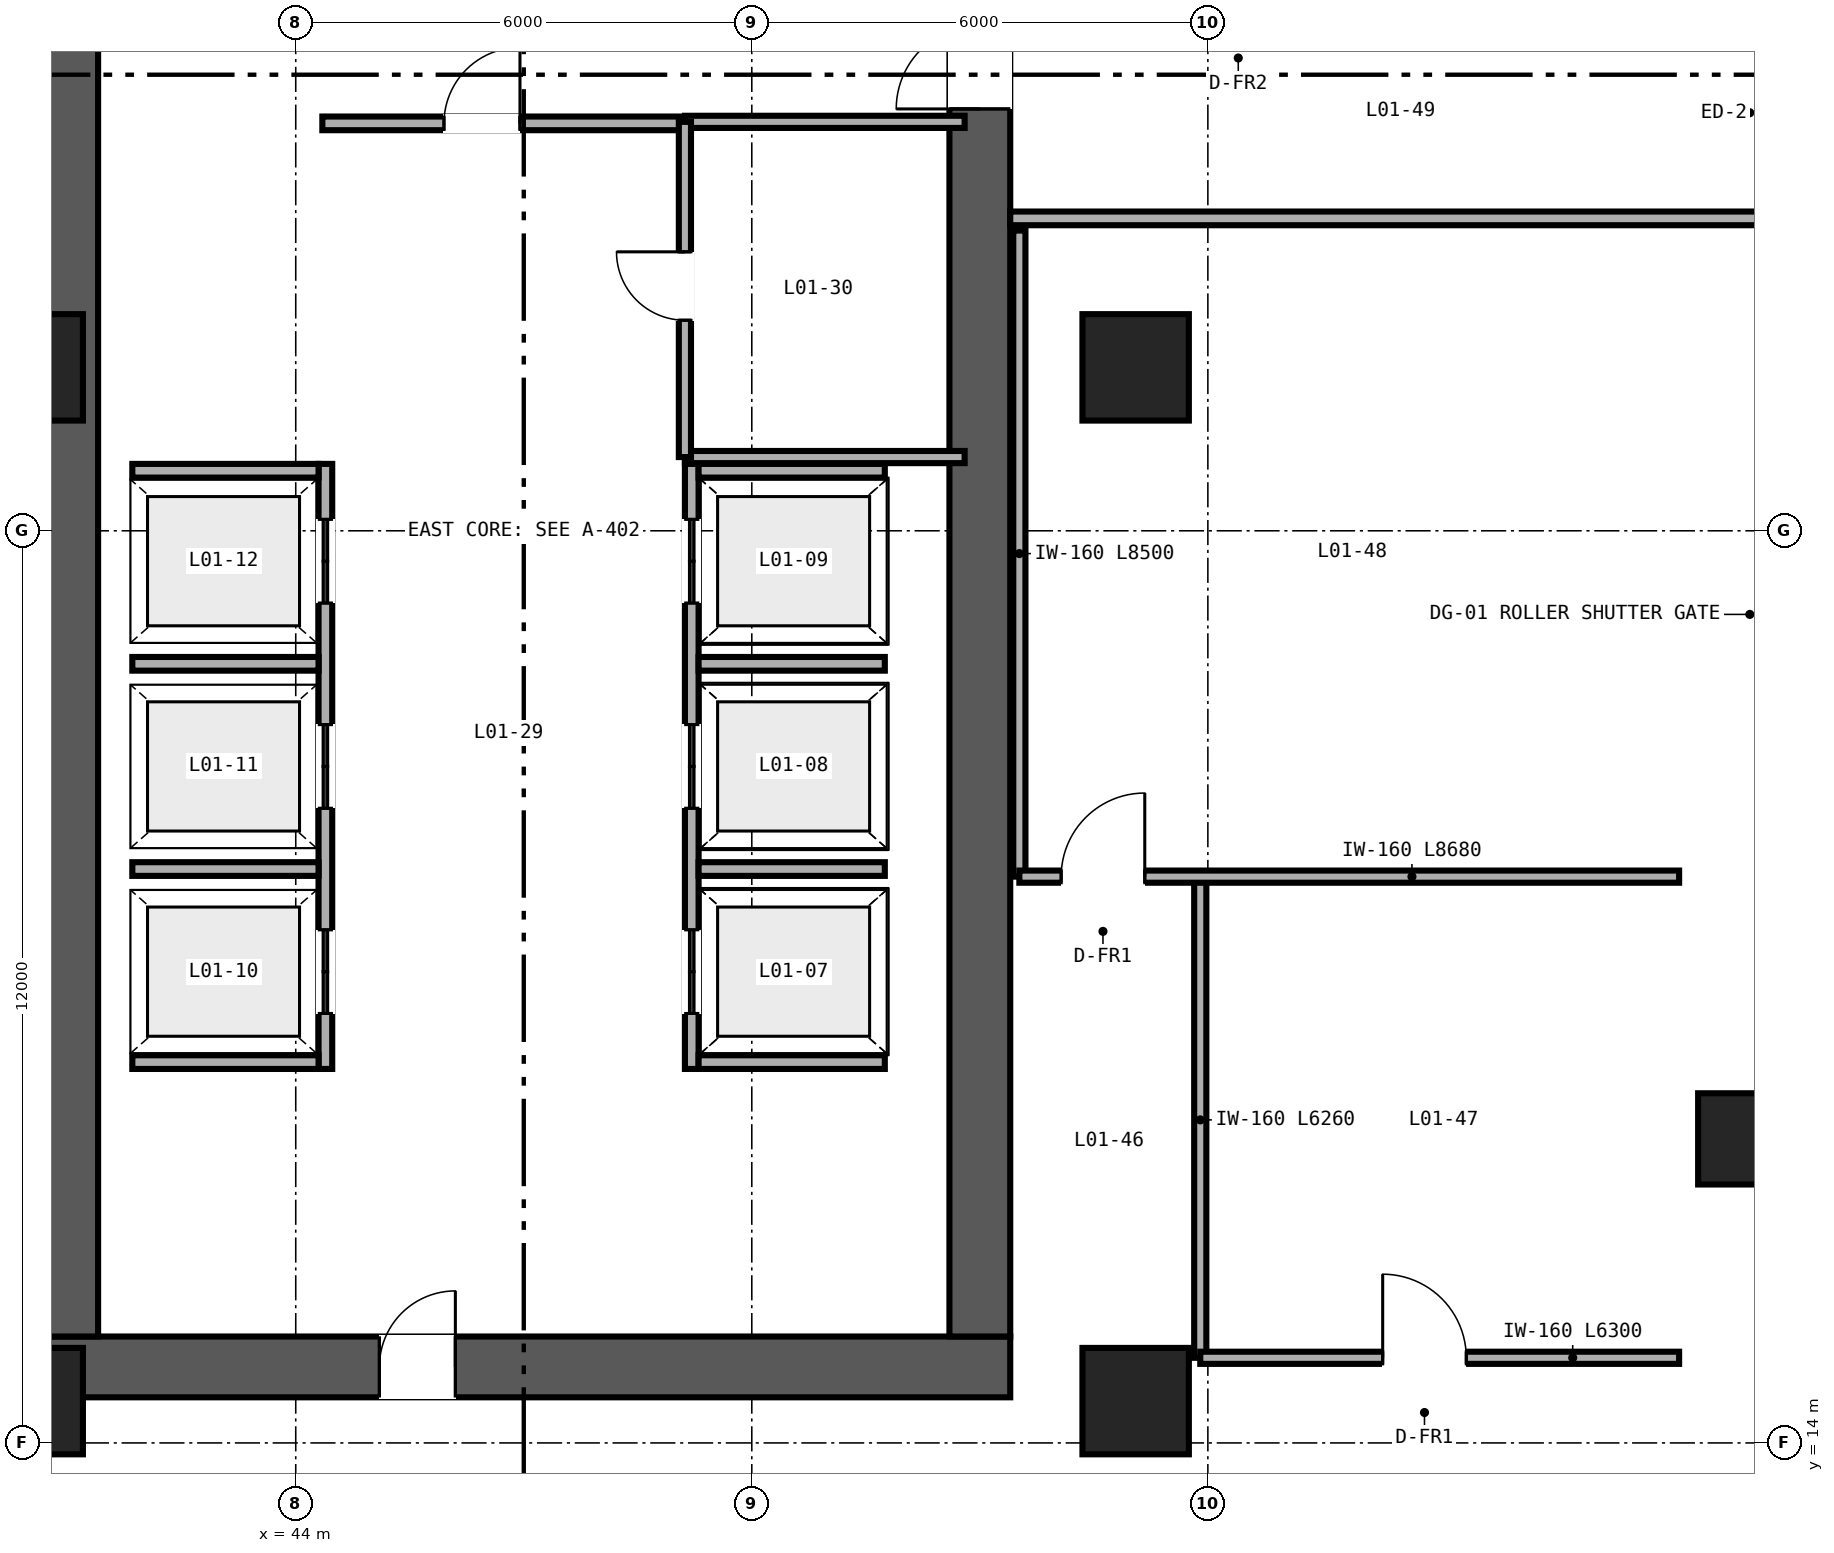
"""IFC4 building model, lengths in metres.
Left out: names, types, materials, properties, quantities, classifications, styles, units other than length and angle.
Written with IfcOpenShell. Run it as: python <this file> out.ifc"""

import sys

from ifc_helpers import new_model, si_unit, direction, frame, frame_2d, origin, origin_2d, place, context, subcontext, project, spatial, rectangle, extrude, source, transform, mapped, element, fill, save


model = new_model("IFC4")
c1 = context("Model", 3, precision=1e-05, world=origin(), true_north=direction((0.0, 1.0)))
c2 = subcontext(c1, "Body", "Model", "MODEL_VIEW")
j1 = project(units=[si_unit("LENGTHUNIT", "METRE"), si_unit("PLANEANGLEUNIT", "RADIAN")], contexts=[c1])
p1 = place(None, origin())
s1 = spatial("IfcSite", under=j1, at=p1, CompositionType="ELEMENT")
p2 = place(p1, origin())
s2 = spatial("IfcBuilding", under=s1, at=p2, CompositionType="ELEMENT")
p3 = place(p2, origin())
s3 = spatial("IfcBuildingStorey", under=s2, at=p3, CompositionType="ELEMENT", Elevation=0.0)
p4 = place(p3, frame((40.6, 15.0, 0.0), z_axis=(0.0, 0.0, 1.0), x_axis=(1.0, 0.0, 0.0)))
e1 = element("IfcWall", 1, at=p4, inside=s3, PredefinedType="SHEAR", context=c2, shape_type="SweptSolid", body=[
    extrude(rectangle(XDim=12.8, YDim=0.8, at=frame_2d((6.4, 0.0))), origin(), (0.0, 0.0, 1.0), 5.71),
])
p5 = place(p4, frame((4.5, 0.0, 0.0)))
e2 = element("IfcOpeningElement", 2, at=p5, cuts=e1, PredefinedType="OPENING", context=c2, shape_type="SweptSolid", body=[
    extrude(rectangle(XDim=1.0, YDim=2.15, at=frame_2d((0.5, 1.075))), frame((0.0, 0.41, 0.0), z_axis=(0.0, -1.0, 0.0), x_axis=(1.0, 0.0, 0.0)), (0.0, 0.0, 1.0), 0.82),
])
p6 = place(p3, frame((41.0, 15.4, 0.0), z_axis=(0.0, 0.0, 1.0), x_axis=(0.0, 1.0, 0.0)))
e3 = element("IfcWall", 3, at=p6, inside=s3, PredefinedType="SHEAR", context=c2, shape_type="SweptSolid", body=[
    extrude(rectangle(XDim=21.2, YDim=0.8, at=frame_2d((10.6, 0.0))), origin(), (0.0, 0.0, 1.0), 5.71),
])
p7 = place(p3, frame((53.0, 15.4, 0.0), z_axis=(0.0, 0.0, 1.0), x_axis=(0.0, 1.0, 0.0)))
e4 = element("IfcWall", 4, at=p7, inside=s3, PredefinedType="SHEAR", context=c2, shape_type="SweptSolid", body=[
    extrude(rectangle(XDim=21.2, YDim=0.8, at=frame_2d((10.6, 0.0))), origin(), (0.0, 0.0, 1.0), 5.71),
])
p8 = place(p7, frame((16.15, 0.0, 0.0)))
e5 = element("IfcOpeningElement", 5, at=p8, cuts=e4, PredefinedType="OPENING", context=c2, shape_type="SweptSolid", body=[
    extrude(rectangle(XDim=1.1, YDim=2.15, at=frame_2d((0.55, 1.075))), frame((0.0, 0.41, 0.0), z_axis=(0.0, -1.0, 0.0), x_axis=(1.0, 0.0, 0.0)), (0.0, 0.0, 1.0), 0.82),
])
m1 = source(origin(), c2, "Body", "SweptSolid", [
    extrude(rectangle(XDim=1.2, YDim=1.2, at=origin_2d()), origin(), (0.0, 0.0, 1.0), 5.71),
])
p9 = place(p3, frame((63.05, 18.0, 0.0), z_axis=(0.0, 0.0, 1.0), x_axis=(1.0, 0.0, 0.0)))
e6 = element("IfcColumn", 6, at=p9, inside=s3, PredefinedType="COLUMN", context=c2, shape_type="MappedRepresentation", body=[
    mapped(m1, transform((0.0, 0.0, 0.0), scale=1.0)),
])
m2 = source(origin(), c2, "Body", "SweptSolid", [
    extrude(rectangle(XDim=1.4, YDim=1.4, at=origin_2d()), origin(), (0.0, 0.0, 1.0), 5.71),
])
for number, where, z_axis, x_axis in (
    (7, (40.5, 14.55, 0.0), (0.0, 0.0, 1.0), (1.0, 0.0, 0.0)),
    (8, (55.05, 14.55, 0.0), (0.0, 0.0, 1.0), (1.0, 0.0, 0.0)),
    (9, (40.5, 28.15, 0.0), (0.0, 0.0, 1.0), (1.0, 0.0, 0.0)),
    (10, (55.05, 28.15, 0.0), (0.0, 0.0, 1.0), (1.0, 0.0, 0.0)),
):
    element("IfcColumn", number, at=place(p3, frame(where, z_axis=z_axis, x_axis=x_axis)), inside=s3, PredefinedType="COLUMN", context=c2, shape_type="MappedRepresentation", body=[
        mapped(m2, transform((0.0, 0.0, 0.0), scale=1.0)),
    ])
p10 = place(p3, frame((49.21, 18.92, 0.0), z_axis=(0.0, 0.0, 1.0), x_axis=(0.0, 1.0, 0.0)))
e11 = element("IfcWall", 11, at=p10, inside=s3, PredefinedType="SOLIDWALL", context=c2, shape_type="SweptSolid", body=[
    extrude(rectangle(XDim=7.96, YDim=0.18, at=frame_2d((3.98, 0.0))), origin(), (0.0, 0.0, 1.0), 5.71),
])
p11 = place(p10, frame((0.73, 0.0, 0.0)))
e12 = element("IfcOpeningElement", 12, at=p11, cuts=e11, PredefinedType="OPENING", context=c2, shape_type="SweptSolid", body=[
    extrude(rectangle(XDim=1.1, YDim=2.2, at=frame_2d((0.55, 1.1))), frame((0.0, 0.1, 0.0), z_axis=(0.0, -1.0, 0.0), x_axis=(1.0, 0.0, 0.0)), (0.0, 0.0, 1.0), 0.2),
])
p12 = place(p10, frame((3.43, 0.0, 0.0)))
e13 = element("IfcOpeningElement", 13, at=p12, cuts=e11, PredefinedType="OPENING", context=c2, shape_type="SweptSolid", body=[
    extrude(rectangle(XDim=1.1, YDim=2.2, at=frame_2d((0.55, 1.1))), frame((0.0, 0.1, 0.0), z_axis=(0.0, -1.0, 0.0), x_axis=(1.0, 0.0, 0.0)), (0.0, 0.0, 1.0), 0.2),
])
p13 = place(p10, frame((6.13, 0.0, 0.0)))
e14 = element("IfcOpeningElement", 14, at=p13, cuts=e11, PredefinedType="OPENING", context=c2, shape_type="SweptSolid", body=[
    extrude(rectangle(XDim=1.1, YDim=2.2, at=frame_2d((0.55, 1.1))), frame((0.0, 0.1, 0.0), z_axis=(0.0, -1.0, 0.0), x_axis=(1.0, 0.0, 0.0)), (0.0, 0.0, 1.0), 0.2),
])
for number, where, z_axis, x_axis in (
    (15, (49.3, 19.01, 0.0), (0.0, 0.0, 1.0), (1.0, 0.0, 0.0)),
    (16, (49.3, 26.79, 0.0), (0.0, 0.0, 1.0), (1.0, 0.0, 0.0)),
    (17, (49.3, 21.55, 0.0), (0.0, 0.0, 1.0), (1.0, 0.0, 0.0)),
    (18, (49.3, 24.25, 0.0), (0.0, 0.0, 1.0), (1.0, 0.0, 0.0)),
):
    element("IfcWall", number, at=place(p3, frame(where, z_axis=z_axis, x_axis=x_axis)), inside=s3, PredefinedType="SOLIDWALL", context=c2, shape_type="SweptSolid", body=[
        extrude(rectangle(XDim=2.45, YDim=0.18, at=frame_2d((1.225, 0.0))), origin(), (0.0, 0.0, 1.0), 5.71),
    ])
p14 = place(p3, frame((44.39, 18.92, 0.0), z_axis=(0.0, 0.0, 1.0), x_axis=(0.0, 1.0, 0.0)))
e19 = element("IfcWall", 19, at=p14, inside=s3, PredefinedType="SOLIDWALL", context=c2, shape_type="SweptSolid", body=[
    extrude(rectangle(XDim=7.96, YDim=0.18, at=frame_2d((3.98, 0.0))), origin(), (0.0, 0.0, 1.0), 5.71),
])
p15 = place(p14, frame((0.73, 0.0, 0.0)))
e20 = element("IfcOpeningElement", 20, at=p15, cuts=e19, PredefinedType="OPENING", context=c2, shape_type="SweptSolid", body=[
    extrude(rectangle(XDim=1.1, YDim=2.2, at=frame_2d((0.55, 1.1))), frame((0.0, 0.1, 0.0), z_axis=(0.0, -1.0, 0.0), x_axis=(1.0, 0.0, 0.0)), (0.0, 0.0, 1.0), 0.2),
])
p16 = place(p14, frame((3.43, 0.0, 0.0)))
e21 = element("IfcOpeningElement", 21, at=p16, cuts=e19, PredefinedType="OPENING", context=c2, shape_type="SweptSolid", body=[
    extrude(rectangle(XDim=1.1, YDim=2.2, at=frame_2d((0.55, 1.1))), frame((0.0, 0.1, 0.0), z_axis=(0.0, -1.0, 0.0), x_axis=(1.0, 0.0, 0.0)), (0.0, 0.0, 1.0), 0.2),
])
p17 = place(p14, frame((6.13, 0.0, 0.0)))
e22 = element("IfcOpeningElement", 22, at=p17, cuts=e19, PredefinedType="OPENING", context=c2, shape_type="SweptSolid", body=[
    extrude(rectangle(XDim=1.1, YDim=2.2, at=frame_2d((0.55, 1.1))), frame((0.0, 0.1, 0.0), z_axis=(0.0, -1.0, 0.0), x_axis=(1.0, 0.0, 0.0)), (0.0, 0.0, 1.0), 0.2),
])
for number, where, z_axis, x_axis in (
    (23, (41.85, 19.01, 0.0), (0.0, 0.0, 1.0), (1.0, 0.0, 0.0)),
    (24, (41.85, 26.79, 0.0), (0.0, 0.0, 1.0), (1.0, 0.0, 0.0)),
    (25, (41.85, 21.55, 0.0), (0.0, 0.0, 1.0), (1.0, 0.0, 0.0)),
    (26, (41.85, 24.25, 0.0), (0.0, 0.0, 1.0), (1.0, 0.0, 0.0)),
):
    element("IfcWall", number, at=place(p3, frame(where, z_axis=z_axis, x_axis=x_axis)), inside=s3, PredefinedType="SOLIDWALL", context=c2, shape_type="SweptSolid", body=[
        extrude(rectangle(XDim=2.45, YDim=0.18, at=frame_2d((1.225, 0.0))), origin(), (0.0, 0.0, 1.0), 5.71),
    ])
p18 = place(p3, frame((44.35, 31.36, 0.0), z_axis=(0.0, 0.0, 1.0), x_axis=(1.0, 0.0, 0.0)))
e27 = element("IfcWall", 27, at=p18, inside=s3, PredefinedType="SOLIDWALL", context=c2, shape_type="SweptSolid", body=[
    extrude(rectangle(XDim=4.85, YDim=0.18, at=frame_2d((2.425, 0.0))), origin(), (0.0, 0.0, 1.0), 4.61),
])
p19 = place(p18, frame((1.6, 0.0, 0.0)))
e28 = element("IfcOpeningElement", 28, at=p19, cuts=e27, PredefinedType="OPENING", context=c2, shape_type="SweptSolid", body=[
    extrude(rectangle(XDim=1.0, YDim=2.15, at=frame_2d((0.5, 1.075))), frame((0.0, 0.1, 0.0), z_axis=(0.0, -1.0, 0.0), x_axis=(1.0, 0.0, 0.0)), (0.0, 0.0, 1.0), 0.2),
])
p20 = place(p3, frame((49.12, 26.97, 0.0), z_axis=(0.0, 0.0, 1.0), x_axis=(1.0, 0.0, 0.0)))
e29 = element("IfcWall", 29, at=p20, inside=s3, PredefinedType="PARTITIONING", context=c2, shape_type="SweptSolid", body=[
    extrude(rectangle(XDim=3.68, YDim=0.16, at=frame_2d((1.84, 0.0))), origin(), (0.0, 0.0, 1.0), 5.71),
])
p21 = place(p3, frame((49.12, 31.38, 0.0), z_axis=(0.0, 0.0, 1.0), x_axis=(1.0, 0.0, 0.0)))
e30 = element("IfcWall", 30, at=p21, inside=s3, PredefinedType="PARTITIONING", context=c2, shape_type="SweptSolid", body=[
    extrude(rectangle(XDim=3.68, YDim=0.16, at=frame_2d((1.84, 0.0))), origin(), (0.0, 0.0, 1.0), 4.61),
])
p22 = place(p3, frame((49.12, 26.97, 0.0), z_axis=(0.0, 0.0, 1.0), x_axis=(0.0, 1.0, 0.0)))
e31 = element("IfcWall", 31, at=p22, inside=s3, PredefinedType="PARTITIONING", context=c2, shape_type="SweptSolid", body=[
    extrude(rectangle(XDim=4.41, YDim=0.16, at=frame_2d((2.205, 0.0))), origin(), (0.0, 0.0, 1.0), 4.61),
])
p23 = place(p22, frame((1.8, 0.0, 0.0)))
e32 = element("IfcOpeningElement", 32, at=p23, cuts=e31, PredefinedType="OPENING", context=c2, shape_type="SweptSolid", body=[
    extrude(rectangle(XDim=0.9, YDim=2.15, at=frame_2d((0.45, 1.075))), frame((0.0, 0.09, 0.0), z_axis=(0.0, -1.0, 0.0), x_axis=(1.0, 0.0, 0.0)), (0.0, 0.0, 1.0), 0.18),
])
p24 = place(p3, frame((55.9, 15.12, 0.0), z_axis=(0.0, 0.0, 1.0), x_axis=(0.0, 1.0, 0.0)))
e33 = element("IfcWall", 33, at=p24, inside=s3, PredefinedType="PARTITIONING", context=c2, shape_type="SweptSolid", body=[
    extrude(rectangle(XDim=6.26, YDim=0.16, at=frame_2d((3.13, 0.0))), origin(), (0.0, 0.0, 1.0), 5.71),
])
p25 = place(p3, frame((55.9, 15.12, 0.0), z_axis=(0.0, 0.0, 1.0), x_axis=(1.0, 0.0, 0.0)))
e34 = element("IfcWall", 34, at=p25, inside=s3, PredefinedType="PARTITIONING", context=c2, shape_type="SweptSolid", body=[
    extrude(rectangle(XDim=6.3, YDim=0.16, at=frame_2d((3.15, 0.0))), origin(), (0.0, 0.0, 1.0), 5.71),
])
p26 = place(p25, frame((2.4, 0.0, 0.0)))
e35 = element("IfcOpeningElement", 35, at=p26, cuts=e34, PredefinedType="OPENING", context=c2, shape_type="SweptSolid", body=[
    extrude(rectangle(XDim=1.1, YDim=2.15, at=frame_2d((0.55, 1.075))), frame((0.0, 0.09, 0.0), z_axis=(0.0, -1.0, 0.0), x_axis=(1.0, 0.0, 0.0)), (0.0, 0.0, 1.0), 0.18),
])
p27 = place(p3, frame((53.52, 21.45, 0.0), z_axis=(0.0, 0.0, 1.0), x_axis=(0.0, 1.0, 0.0)))
e36 = element("IfcWall", 36, at=p27, inside=s3, PredefinedType="PARTITIONING", context=c2, shape_type="SweptSolid", body=[
    extrude(rectangle(XDim=8.5, YDim=0.16, at=frame_2d((4.25, 0.0))), origin(), (0.0, 0.0, 1.0), 4.783),
])
p28 = place(p3, frame((53.52, 21.45, 0.0), z_axis=(0.0, 0.0, 1.0), x_axis=(1.0, 0.0, 0.0)))
e37 = element("IfcWall", 37, at=p28, inside=s3, PredefinedType="PARTITIONING", context=c2, shape_type="SweptSolid", body=[
    extrude(rectangle(XDim=8.68, YDim=0.16, at=frame_2d((4.34, 0.0))), origin(), (0.0, 0.0, 1.0), 4.931),
])
p29 = place(p28, frame((0.55, 0.0, 0.0)))
e38 = element("IfcOpeningElement", 38, at=p29, cuts=e37, PredefinedType="OPENING", context=c2, shape_type="SweptSolid", body=[
    extrude(rectangle(XDim=1.1, YDim=2.15, at=frame_2d((0.55, 1.075))), frame((0.0, 0.09, 0.0), z_axis=(0.0, -1.0, 0.0), x_axis=(1.0, 0.0, 0.0)), (0.0, 0.0, 1.0), 0.18),
])
p30 = place(p3, frame((53.4, 30.11, 0.0), z_axis=(0.0, 0.0, 1.0), x_axis=(1.0, 0.0, 0.0)))
e39 = element("IfcWall", 39, at=p30, inside=s3, PredefinedType="SOLIDWALL", context=c2, shape_type="SweptSolid", body=[
    extrude(rectangle(XDim=10.25, YDim=0.18, at=frame_2d((5.125, 0.0))), origin(), (0.0, 0.0, 1.0), 4.931),
])
m3 = source(origin(), c2, "Body", "SweptSolid", [
    extrude(rectangle(XDim=1.1, YDim=2.2, at=frame_2d((0.55, 1.1))), frame((0.0, 0.025, 0.0), z_axis=(0.0, -1.0, 0.0), x_axis=(1.0, 0.0, 0.0)), (0.0, 0.0, 1.0), 0.05),
])
p31 = place(p11, origin())
e40 = element("IfcDoor", 40, at=p31, inside=s3, OperationType="DOUBLE_DOOR_SLIDING", PredefinedType="DOOR", context=c2, shape_type="MappedRepresentation", body=[
    mapped(m3, transform((0.0, 0.0, 0.0), scale=1.0)),
])
fill(e12, e40)
p32 = place(p12, origin())
e41 = element("IfcDoor", 41, at=p32, inside=s3, OperationType="DOUBLE_DOOR_SLIDING", PredefinedType="DOOR", context=c2, shape_type="MappedRepresentation", body=[
    mapped(m3, transform((0.0, 0.0, 0.0), scale=1.0)),
])
fill(e13, e41)
p33 = place(p13, origin())
e42 = element("IfcDoor", 42, at=p33, inside=s3, OperationType="DOUBLE_DOOR_SLIDING", PredefinedType="DOOR", context=c2, shape_type="MappedRepresentation", body=[
    mapped(m3, transform((0.0, 0.0, 0.0), scale=1.0)),
])
fill(e14, e42)
p34 = place(p15, origin())
e43 = element("IfcDoor", 43, at=p34, inside=s3, OperationType="DOUBLE_DOOR_SLIDING", PredefinedType="DOOR", context=c2, shape_type="MappedRepresentation", body=[
    mapped(m3, transform((0.0, 0.0, 0.0), scale=1.0)),
])
fill(e20, e43)
p35 = place(p16, origin())
e44 = element("IfcDoor", 44, at=p35, inside=s3, OperationType="DOUBLE_DOOR_SLIDING", PredefinedType="DOOR", context=c2, shape_type="MappedRepresentation", body=[
    mapped(m3, transform((0.0, 0.0, 0.0), scale=1.0)),
])
fill(e21, e44)
p36 = place(p17, origin())
e45 = element("IfcDoor", 45, at=p36, inside=s3, OperationType="DOUBLE_DOOR_SLIDING", PredefinedType="DOOR", context=c2, shape_type="MappedRepresentation", body=[
    mapped(m3, transform((0.0, 0.0, 0.0), scale=1.0)),
])
fill(e22, e45)
m4 = source(origin(), c2, "Body", "SweptSolid", [
    extrude(rectangle(XDim=1.0, YDim=2.15, at=frame_2d((0.5, 1.075))), frame((0.0, 0.025, 0.0), z_axis=(0.0, -1.0, 0.0), x_axis=(1.0, 0.0, 0.0)), (0.0, 0.0, 1.0), 0.05),
])
p37 = place(p19, origin())
e46 = element("IfcDoor", 46, at=p37, inside=s3, OperationType="SINGLE_SWING_RIGHT", PredefinedType="DOOR", context=c2, shape_type="MappedRepresentation", body=[
    mapped(m4, transform((0.0, 0.0, 0.0), scale=1.0)),
])
fill(e28, e46)
m5 = source(origin(), c2, "Body", "SweptSolid", [
    extrude(rectangle(XDim=1.1, YDim=2.15, at=frame_2d((0.55, 1.075))), frame((0.0, 0.025, 0.0), z_axis=(0.0, -1.0, 0.0), x_axis=(1.0, 0.0, 0.0)), (0.0, 0.0, 1.0), 0.05),
])
p38 = place(p8, origin())
e47 = element("IfcDoor", 47, at=p38, inside=s3, OperationType="SINGLE_SWING_LEFT", PredefinedType="DOOR", context=c2, shape_type="MappedRepresentation", body=[
    mapped(m5, transform((0.0, 0.0, 0.0), scale=1.0)),
])
fill(e5, e47)
p39 = place(p5, origin())
e48 = element("IfcDoor", 48, at=p39, inside=s3, OperationType="SINGLE_SWING_RIGHT", PredefinedType="DOOR", context=c2, shape_type="MappedRepresentation", body=[
    mapped(m4, transform((0.0, 0.0, 0.0), scale=1.0)),
])
fill(e2, e48)
m6 = source(origin(), c2, "Body", "SweptSolid", [
    extrude(rectangle(XDim=0.9, YDim=2.15, at=frame_2d((0.45, 1.075))), frame((0.0, 0.025, 0.0), z_axis=(0.0, -1.0, 0.0), x_axis=(1.0, 0.0, 0.0)), (0.0, 0.0, 1.0), 0.05),
])
p40 = place(p23, origin())
e49 = element("IfcDoor", 49, at=p40, inside=s3, OperationType="SINGLE_SWING_RIGHT", PredefinedType="DOOR", context=c2, shape_type="MappedRepresentation", body=[
    mapped(m6, transform((0.0, 0.0, 0.0), scale=1.0)),
])
fill(e32, e49)
p41 = place(p26, origin())
e50 = element("IfcDoor", 50, at=p41, inside=s3, OperationType="SINGLE_SWING_LEFT", PredefinedType="DOOR", context=c2, shape_type="MappedRepresentation", body=[
    mapped(m5, transform((0.0, 0.0, 0.0), scale=1.0)),
])
fill(e35, e50)
p42 = place(p29, origin())
e51 = element("IfcDoor", 51, at=p42, inside=s3, OperationType="SINGLE_SWING_RIGHT", PredefinedType="DOOR", context=c2, shape_type="MappedRepresentation", body=[
    mapped(m5, transform((0.0, 0.0, 0.0), scale=1.0)),
])
fill(e38, e51)
save(model, sys.argv[1])
